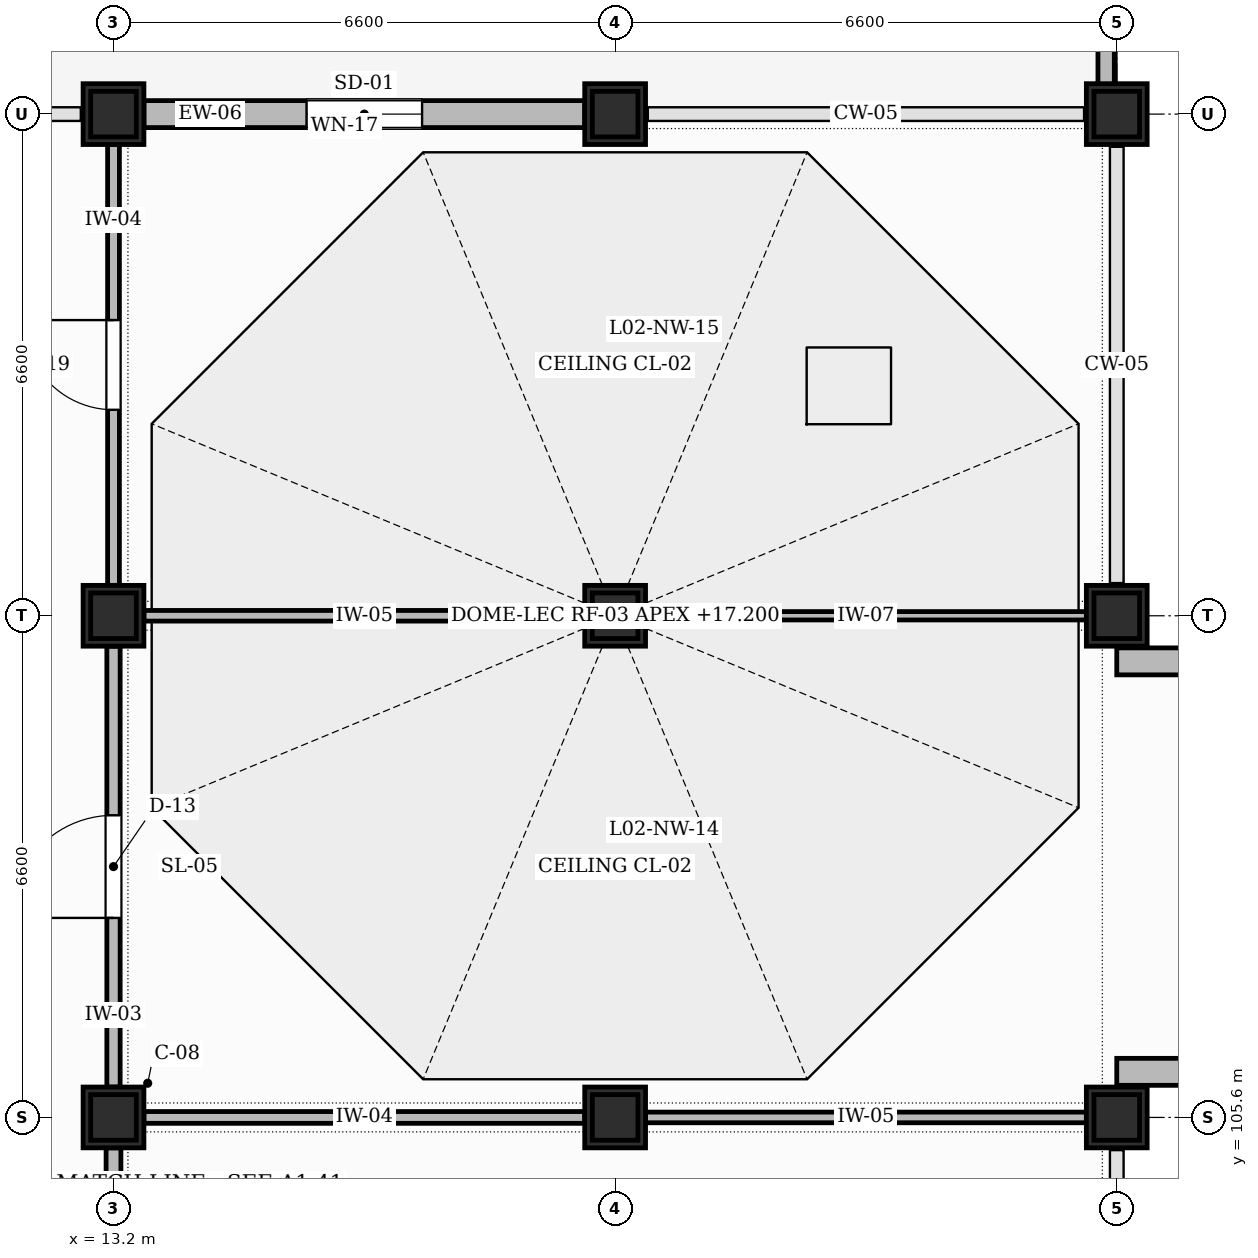
"""IFC4 building model, lengths in metres.
Left out: names, types, materials, properties, quantities, classifications, styles, units other than length and angle.
Written with IfcOpenShell. Run it as: python <this file> out.ifc"""

import sys

from ifc_helpers import new_model, si_unit, direction, frame, frame_2d, origin, origin_2d, place, context, subcontext, project, spatial, rectangle, extrude, element, fill, save


model = new_model("IFC4")
c1 = context("Model", 3, precision=1e-05, world=origin(), true_north=direction((0.0, 1.0)))
c2 = subcontext(c1, "Body", "Model", "MODEL_VIEW")
j1 = project(units=[si_unit("LENGTHUNIT", "METRE"), si_unit("PLANEANGLEUNIT", "RADIAN")], contexts=[c1])
p1 = place(None, origin())
s1 = spatial("IfcSite", under=j1, at=p1, CompositionType="ELEMENT")
p2 = place(p1, origin())
s2 = spatial("IfcBuilding", under=s1, at=p2, CompositionType="ELEMENT")
p3 = place(p2, frame((0.0, 0.0, 10.2)))
s3 = spatial("IfcBuildingStorey", under=s2, at=p3, CompositionType="ELEMENT", Elevation=10.2)
for number, where, z_axis, x_axis in (
    (1, (13.2, 105.6, 0.0), (0.0, 0.0, 1.0), (1.0, 0.0, 0.0)),
    (2, (13.2, 112.2, 0.0), (0.0, 0.0, 1.0), (1.0, 0.0, 0.0)),
    (3, (13.2, 118.8, 0.0), (0.0, 0.0, 1.0), (1.0, 0.0, 0.0)),
    (4, (19.8, 105.6, 0.0), (0.0, 0.0, 1.0), (1.0, 0.0, 0.0)),
    (5, (19.8, 112.2, 0.0), (0.0, 0.0, 1.0), (1.0, 0.0, 0.0)),
    (6, (19.8, 118.8, 0.0), (0.0, 0.0, 1.0), (1.0, 0.0, 0.0)),
    (7, (26.4, 105.6, 0.0), (0.0, 0.0, 1.0), (1.0, 0.0, 0.0)),
    (8, (26.4, 112.2, 0.0), (0.0, 0.0, 1.0), (1.0, 0.0, 0.0)),
    (9, (26.4, 118.8, 0.0), (0.0, 0.0, 1.0), (1.0, 0.0, 0.0)),
):
    element("IfcColumn", number, at=place(p3, frame(where, z_axis=z_axis, x_axis=x_axis)), inside=s3, PredefinedType="COLUMN", context=c2, shape_type="SweptSolid", body=[
        extrude(rectangle(XDim=0.8, YDim=0.8, at=origin_2d()), origin(), (0.0, 0.0, 1.0), 4.2),
    ])
for number, where, z_axis, x_axis in (
    (10, (13.2, 105.6, 4.2), (0.0, 0.0, 1.0), (1.0, 0.0, 0.0)),
    (11, (19.8, 105.6, 4.2), (0.0, 0.0, 1.0), (1.0, 0.0, 0.0)),
    (12, (26.4, 105.6, 4.2), (0.0, 0.0, 1.0), (1.0, 0.0, 0.0)),
    (13, (26.4, 112.2, 4.2), (0.0, 0.0, 1.0), (1.0, 0.0, 0.0)),
    (14, (26.4, 118.8, 4.2), (0.0, 0.0, 1.0), (1.0, 0.0, 0.0)),
    (15, (19.8, 118.8, 4.2), (0.0, 0.0, 1.0), (1.0, 0.0, 0.0)),
    (16, (13.2, 118.8, 4.2), (0.0, 0.0, 1.0), (1.0, 0.0, 0.0)),
    (17, (13.2, 112.2, 4.2), (0.0, 0.0, 1.0), (1.0, 0.0, 0.0)),
):
    element("IfcColumn", number, at=place(p3, frame(where, z_axis=z_axis, x_axis=x_axis)), inside=s3, PredefinedType="COLUMN", context=c2, shape_type="SweptSolid", body=[
        extrude(rectangle(XDim=0.6, YDim=0.6, at=origin_2d()), origin(), (0.0, 0.0, 1.0), 0.65),
    ])
p4 = place(p3, frame((19.8, 112.2, 4.2), z_axis=(0.0, 0.0, 1.0), x_axis=(1.0, 0.0, 0.0)))
e18 = element("IfcColumn", 18, at=p4, inside=s3, PredefinedType="COLUMN", context=c2, shape_type="SweptSolid", body=[
    extrude(rectangle(XDim=0.6, YDim=0.6, at=origin_2d()), origin(), (0.0, 0.0, 1.0), 2.46),
])
p5 = place(p3, frame((13.6, 118.8, 0.0), z_axis=(0.0, 0.0, 1.0), x_axis=(1.0, 0.0, 0.0)))
e19 = element("IfcWall", 19, at=p5, inside=s3, PredefinedType="SOLIDWALL", context=c2, shape_type="SweptSolid", body=[
    extrude(rectangle(XDim=5.8, YDim=0.355, at=frame_2d((2.9, 0.0))), origin(), (0.0, 0.0, 1.0), 3.25),
])
p6 = place(p5, frame((2.14, 0.0, 0.95)))
e20 = element("IfcOpeningElement", 20, at=p6, cuts=e19, PredefinedType="OPENING", context=c2, shape_type="SweptSolid", body=[
    extrude(rectangle(XDim=1.52, YDim=1.3, at=frame_2d((0.76, 0.65))), frame((0.0, 0.188, 0.0), z_axis=(0.0, -1.0, 0.0), x_axis=(1.0, 0.0, 0.0)), (0.0, 0.0, 1.0), 0.375),
])
for number, where, z_axis, x_axis in (
    (21, (26.4, 106.2, 0.0), (0.0, 0.0, 1.0), (1.0, 0.0, 0.0)),
    (22, (26.4, 111.6, 0.0), (0.0, 0.0, 1.0), (1.0, 0.0, 0.0)),
):
    element("IfcWall", number, at=place(p3, frame(where, z_axis=z_axis, x_axis=x_axis)), inside=s3, PredefinedType="SOLIDWALL", context=c2, shape_type="SweptSolid", body=[
        extrude(rectangle(XDim=2.0, YDim=0.355, at=frame_2d((1.0, 0.0))), origin(), (0.0, 0.0, 1.0), 3.25),
    ])
p7 = place(p3, frame((26.26, 119.1, 0.0), z_axis=(0.0, 0.0, 1.0), x_axis=(0.0, 1.0, 0.0)))
e23 = element("IfcWall", 23, at=p7, inside=s3, PredefinedType="PARAPET", context=c2, shape_type="SweptSolid", body=[
    extrude(rectangle(XDim=6.0, YDim=0.215, at=frame_2d((3.0, 0.0))), origin(), (0.0, 0.0, 1.0), 1.15),
])
p8 = place(p3, frame((13.2, 99.4, 0.0), z_axis=(0.0, 0.0, 1.0), x_axis=(0.0, 1.0, 0.0)))
e24 = element("IfcWall", 24, at=p8, inside=s3, PredefinedType="PARTITIONING", context=c2, shape_type="SweptSolid", body=[
    extrude(rectangle(XDim=5.8, YDim=0.195, at=frame_2d((2.9, 0.0))), origin(), (0.0, 0.0, 1.0), 3.1),
])
p9 = place(p8, frame((2.2, 0.0, 0.0)))
e25 = element("IfcOpeningElement", 25, at=p9, cuts=e24, PredefinedType="OPENING", context=c2, shape_type="SweptSolid", body=[
    extrude(rectangle(XDim=1.4, YDim=2.25, at=frame_2d((0.7, 1.125))), frame((0.0, 0.107, 0.0), z_axis=(0.0, -1.0, 0.0), x_axis=(1.0, 0.0, 0.0)), (0.0, 0.0, 1.0), 0.215),
])
p10 = place(p3, frame((13.2, 106.0, 0.0), z_axis=(0.0, 0.0, 1.0), x_axis=(0.0, 1.0, 0.0)))
e26 = element("IfcWall", 26, at=p10, inside=s3, PredefinedType="PARTITIONING", context=c2, shape_type="SweptSolid", body=[
    extrude(rectangle(XDim=5.8, YDim=0.175, at=frame_2d((2.9, 0.0))), origin(), (0.0, 0.0, 1.0), 3.1),
])
p11 = place(p10, frame((2.225, 0.0, 0.0)))
e27 = element("IfcOpeningElement", 27, at=p11, cuts=e26, PredefinedType="OPENING", context=c2, shape_type="SweptSolid", body=[
    extrude(rectangle(XDim=1.35, YDim=2.3, at=frame_2d((0.675, 1.15))), frame((0.0, 0.097, 0.0), z_axis=(0.0, -1.0, 0.0), x_axis=(1.0, 0.0, 0.0)), (0.0, 0.0, 1.0), 0.195),
])
p12 = place(p3, frame((13.2, 112.6, 0.0), z_axis=(0.0, 0.0, 1.0), x_axis=(0.0, 1.0, 0.0)))
e28 = element("IfcWall", 28, at=p12, inside=s3, PredefinedType="PARTITIONING", context=c2, shape_type="SweptSolid", body=[
    extrude(rectangle(XDim=5.8, YDim=0.155, at=frame_2d((2.9, 0.0))), origin(), (0.0, 0.0, 1.0), 3.1),
])
p13 = place(p12, frame((2.31, 0.0, 0.0)))
e29 = element("IfcOpeningElement", 29, at=p13, cuts=e28, PredefinedType="OPENING", context=c2, shape_type="SweptSolid", body=[
    extrude(rectangle(XDim=1.18, YDim=2.2, at=frame_2d((0.59, 1.1))), frame((0.0, 0.087, 0.0), z_axis=(0.0, -1.0, 0.0), x_axis=(1.0, 0.0, 0.0)), (0.0, 0.0, 1.0), 0.175),
])
p14 = place(p3, frame((13.6, 105.6, 0.0), z_axis=(0.0, 0.0, 1.0), x_axis=(1.0, 0.0, 0.0)))
e30 = element("IfcWall", 30, at=p14, inside=s3, PredefinedType="PARTITIONING", context=c2, shape_type="SweptSolid", body=[
    extrude(rectangle(XDim=5.8, YDim=0.155, at=frame_2d((2.9, 0.0))), origin(), (0.0, 0.0, 1.0), 3.0),
])
p15 = place(p3, frame((13.6, 112.2, 0.0), z_axis=(0.0, 0.0, 1.0), x_axis=(1.0, 0.0, 0.0)))
e31 = element("IfcWall", 31, at=p15, inside=s3, PredefinedType="PARTITIONING", context=c2, shape_type="SweptSolid", body=[
    extrude(rectangle(XDim=5.8, YDim=0.14, at=frame_2d((2.9, 0.0))), origin(), (0.0, 0.0, 1.0), 3.1),
])
p16 = place(p3, frame((20.2, 105.6, 0.0), z_axis=(0.0, 0.0, 1.0), x_axis=(1.0, 0.0, 0.0)))
e32 = element("IfcWall", 32, at=p16, inside=s3, PredefinedType="PARTITIONING", context=c2, shape_type="SweptSolid", body=[
    extrude(rectangle(XDim=5.8, YDim=0.14, at=frame_2d((2.9, 0.0))), origin(), (0.0, 0.0, 1.0), 3.4),
])
p17 = place(p3, frame((20.2, 112.2, 0.0), z_axis=(0.0, 0.0, 1.0), x_axis=(1.0, 0.0, 0.0)))
e33 = element("IfcWall", 33, at=p17, inside=s3, PredefinedType="PARTITIONING", context=c2, shape_type="SweptSolid", body=[
    extrude(rectangle(XDim=5.8, YDim=0.11, at=frame_2d((2.9, 0.0))), origin(), (0.0, 0.0, 1.0), 3.4),
])
p18 = place(p6, origin())
e34 = element("IfcWindow", 34, at=p18, inside=s3, PartitioningType="DOUBLE_PANEL_VERTICAL", PredefinedType="WINDOW", context=c2, shape_type="SweptSolid", body=[
    extrude(rectangle(XDim=1.52, YDim=1.3, at=frame_2d((0.76, 0.65))), frame((0.0, 0.03, 0.0), z_axis=(0.0, -1.0, 0.0), x_axis=(1.0, 0.0, 0.0)), (0.0, 0.0, 1.0), 0.06),
])
fill(e20, e34)
p19 = place(p11, origin())
e35 = element("IfcDoor", 35, at=p19, inside=s3, OperationType="SINGLE_SWING_LEFT", PredefinedType="DOOR", context=c2, shape_type="SweptSolid", body=[
    extrude(rectangle(XDim=1.35, YDim=2.3, at=frame_2d((0.675, 1.15))), frame((0.0, 0.025, 0.0), z_axis=(0.0, -1.0, 0.0), x_axis=(1.0, 0.0, 0.0)), (0.0, 0.0, 1.0), 0.05),
])
fill(e27, e35)
p20 = place(p13, origin())
e36 = element("IfcDoor", 36, at=p20, inside=s3, OperationType="SINGLE_SWING_RIGHT", PredefinedType="DOOR", context=c2, shape_type="SweptSolid", body=[
    extrude(rectangle(XDim=1.18, YDim=2.2, at=frame_2d((0.59, 1.1))), frame((0.0, 0.025, 0.0), z_axis=(0.0, -1.0, 0.0), x_axis=(1.0, 0.0, 0.0)), (0.0, 0.0, 1.0), 0.05),
])
fill(e29, e36)
save(model, sys.argv[1])
